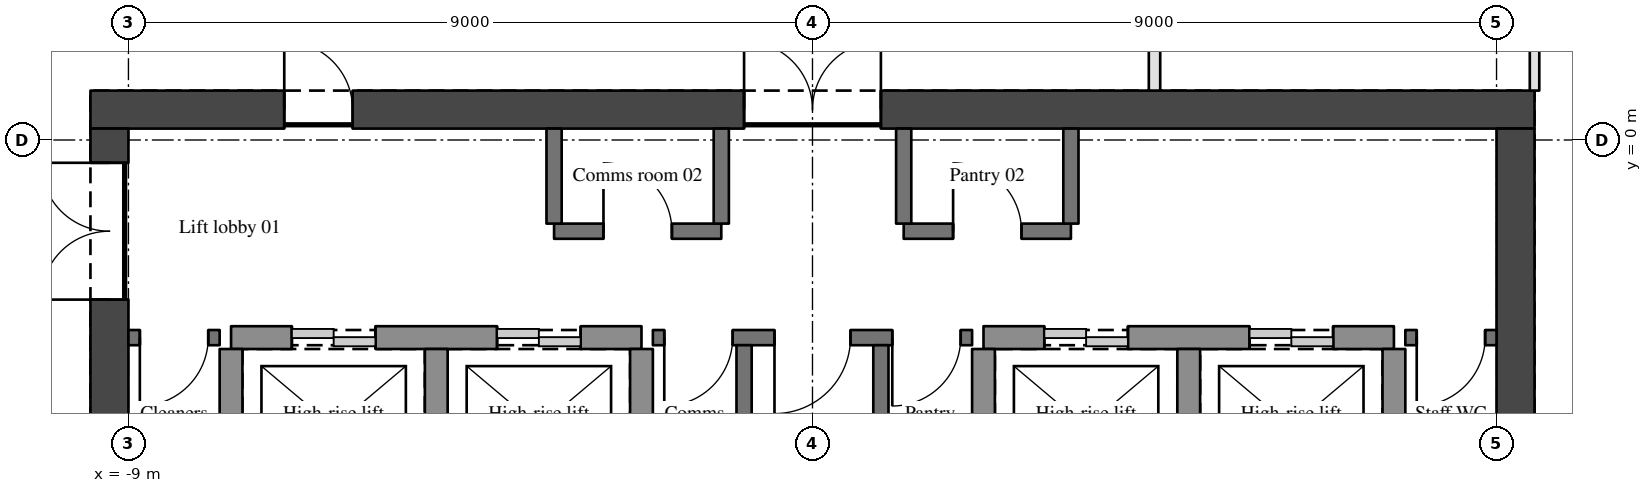
"""IFC4 building model, lengths in metres.
Left out: names, types, materials, properties, quantities, classifications, styles, units other than length and angle.
Written with IfcOpenShell. Run it as: python <this file> out.ifc"""

import sys

from ifc_helpers import new_model, si_unit, direction, frame, frame_2d, origin, place, context, subcontext, project, spatial, rectangle, extrude, element, fill, save


model = new_model("IFC4")
c1 = context("Model", 3, precision=1e-05, world=origin(), true_north=direction((0.0, 1.0)))
c2 = subcontext(c1, "Body", "Model", "MODEL_VIEW")
j1 = project(units=[si_unit("LENGTHUNIT", "METRE"), si_unit("PLANEANGLEUNIT", "RADIAN")], contexts=[c1])
p1 = place(None, origin())
s1 = spatial("IfcSite", under=j1, at=p1, CompositionType="ELEMENT")
p2 = place(p1, origin())
s2 = spatial("IfcBuilding", under=s1, at=p2, CompositionType="ELEMENT")
p3 = place(p2, frame((0.0, 0.0, 251.85)))
s3 = spatial("IfcBuildingStorey", under=s2, at=p3, CompositionType="ELEMENT", Elevation=251.85)
p4 = place(p3, frame((-9.5, 0.4, 0.0), z_axis=(0.0, 0.0, 1.0), x_axis=(1.0, 0.0, 0.0)))
e1 = element("IfcWall", 1, at=p4, inside=s3, PredefinedType="SHEAR", context=c2, shape_type="SweptSolid", body=[
    extrude(rectangle(XDim=19.0, YDim=0.5, at=frame_2d((9.5, 0.0))), origin(), (0.0, 0.0, 1.0), 3.15),
])
p5 = place(p4, frame((8.6, 0.0, 0.0)))
e2 = element("IfcOpeningElement", 2, at=p5, cuts=e1, PredefinedType="OPENING", context=c2, shape_type="SweptSolid", body=[
    extrude(rectangle(XDim=1.8, YDim=2.1, at=frame_2d((0.9, 1.05))), frame((0.0, 0.26, 0.0), z_axis=(0.0, -1.0, 0.0), x_axis=(1.0, 0.0, 0.0)), (0.0, 0.0, 1.0), 0.52),
])
p6 = place(p4, frame((2.55, 0.0, 0.0)))
e3 = element("IfcOpeningElement", 3, at=p6, cuts=e1, PredefinedType="OPENING", context=c2, shape_type="SweptSolid", body=[
    extrude(rectangle(XDim=0.9, YDim=2.1, at=frame_2d((0.45, 1.05))), frame((0.0, 0.26, 0.0), z_axis=(0.0, -1.0, 0.0), x_axis=(1.0, 0.0, 0.0)), (0.0, 0.0, 1.0), 0.52),
])
p7 = place(p3, frame((-9.25, -11.5, 0.0), z_axis=(0.0, 0.0, 1.0), x_axis=(0.0, 1.0, 0.0)))
e4 = element("IfcWall", 4, at=p7, inside=s3, PredefinedType="SHEAR", context=c2, shape_type="SweptSolid", body=[
    extrude(rectangle(XDim=11.65, YDim=0.5, at=frame_2d((5.825, 0.0))), origin(), (0.0, 0.0, 1.0), 3.15),
])
p8 = place(p7, frame((9.4, 0.0, 0.0)))
e5 = element("IfcOpeningElement", 5, at=p8, cuts=e4, PredefinedType="OPENING", context=c2, shape_type="SweptSolid", body=[
    extrude(rectangle(XDim=1.8, YDim=2.1, at=frame_2d((0.9, 1.05))), frame((0.0, 0.26, 0.0), z_axis=(0.0, -1.0, 0.0), x_axis=(1.0, 0.0, 0.0)), (0.0, 0.0, 1.0), 0.52),
])
p9 = place(p3, frame((9.25, -11.5, 0.0), z_axis=(0.0, 0.0, 1.0), x_axis=(0.0, 1.0, 0.0)))
e6 = element("IfcWall", 6, at=p9, inside=s3, PredefinedType="SHEAR", context=c2, shape_type="SweptSolid", body=[
    extrude(rectangle(XDim=11.65, YDim=0.5, at=frame_2d((5.825, 0.0))), origin(), (0.0, 0.0, 1.0), 3.15),
])
p10 = place(p3, frame((-7.8, -2.6, 0.0), z_axis=(0.0, 0.0, 1.0), x_axis=(-1.0, 0.0, 0.0)))
e7 = element("IfcWall", 7, at=p10, inside=s3, PredefinedType="SOLIDWALL", context=c2, shape_type="SweptSolid", body=[
    extrude(rectangle(XDim=1.2, YDim=0.2, at=frame_2d((0.6, 0.0))), origin(), (0.0, 0.0, 1.0), 2.85),
])
p11 = place(p10, frame((0.15, 0.0, 0.0)))
e8 = element("IfcOpeningElement", 8, at=p11, cuts=e7, PredefinedType="OPENING", context=c2, shape_type="SweptSolid", body=[
    extrude(rectangle(XDim=0.9, YDim=2.1, at=frame_2d((0.45, 1.05))), frame((0.0, 0.11, 0.0), z_axis=(0.0, -1.0, 0.0), x_axis=(1.0, 0.0, 0.0)), (0.0, 0.0, 1.0), 0.22),
])
p12 = place(p3, frame((-7.65, -2.6, 0.0), z_axis=(0.0, 0.0, 1.0), x_axis=(1.0, 0.0, 0.0)))
e9 = element("IfcWall", 9, at=p12, inside=s3, PredefinedType="SHEAR", context=c2, shape_type="SweptSolid", body=[
    extrude(rectangle(XDim=5.4, YDim=0.3, at=frame_2d((2.7, 0.0))), origin(), (0.0, 0.0, 1.0), 3.15),
])
p13 = place(p12, frame((0.8, 0.0, 0.0)))
e10 = element("IfcOpeningElement", 10, at=p13, cuts=e9, PredefinedType="OPENING", context=c2, shape_type="SweptSolid", body=[
    extrude(rectangle(XDim=1.1, YDim=2.1, at=frame_2d((0.55, 1.05))), frame((0.0, 0.16, 0.0), z_axis=(0.0, -1.0, 0.0), x_axis=(1.0, 0.0, 0.0)), (0.0, 0.0, 1.0), 0.32),
])
p14 = place(p12, frame((3.5, 0.0, 0.0)))
e11 = element("IfcOpeningElement", 11, at=p14, cuts=e9, PredefinedType="OPENING", context=c2, shape_type="SweptSolid", body=[
    extrude(rectangle(XDim=1.1, YDim=2.1, at=frame_2d((0.55, 1.05))), frame((0.0, 0.16, 0.0), z_axis=(0.0, -1.0, 0.0), x_axis=(1.0, 0.0, 0.0)), (0.0, 0.0, 1.0), 0.32),
])
p15 = place(p3, frame((2.1, -2.6, 0.0), z_axis=(0.0, 0.0, 1.0), x_axis=(-1.0, 0.0, 0.0)))
e12 = element("IfcWall", 12, at=p15, inside=s3, PredefinedType="SOLIDWALL", context=c2, shape_type="SweptSolid", body=[
    extrude(rectangle(XDim=4.2, YDim=0.2, at=frame_2d((2.1, 0.0))), origin(), (0.0, 0.0, 1.0), 2.85),
])
p16 = place(p15, frame((1.6, 0.0, 0.0)))
e13 = element("IfcOpeningElement", 13, at=p16, cuts=e12, PredefinedType="OPENING", context=c2, shape_type="SweptSolid", body=[
    extrude(rectangle(XDim=1.0, YDim=2.1, at=frame_2d((0.5, 1.05))), frame((0.0, 0.11, 0.0), z_axis=(0.0, -1.0, 0.0), x_axis=(1.0, 0.0, 0.0)), (0.0, 0.0, 1.0), 0.22),
])
p17 = place(p15, frame((3.15, 0.0, 0.0)))
e14 = element("IfcOpeningElement", 14, at=p17, cuts=e12, PredefinedType="OPENING", context=c2, shape_type="SweptSolid", body=[
    extrude(rectangle(XDim=0.9, YDim=2.1, at=frame_2d((0.45, 1.05))), frame((0.0, 0.11, 0.0), z_axis=(0.0, -1.0, 0.0), x_axis=(1.0, 0.0, 0.0)), (0.0, 0.0, 1.0), 0.22),
])
p18 = place(p15, frame((0.15, 0.0, 0.0)))
e15 = element("IfcOpeningElement", 15, at=p18, cuts=e12, PredefinedType="OPENING", context=c2, shape_type="SweptSolid", body=[
    extrude(rectangle(XDim=0.9, YDim=2.1, at=frame_2d((0.45, 1.05))), frame((0.0, 0.11, 0.0), z_axis=(0.0, -1.0, 0.0), x_axis=(1.0, 0.0, 0.0)), (0.0, 0.0, 1.0), 0.22),
])
p19 = place(p3, frame((2.25, -2.6, 0.0), z_axis=(0.0, 0.0, 1.0), x_axis=(1.0, 0.0, 0.0)))
e16 = element("IfcWall", 16, at=p19, inside=s3, PredefinedType="SHEAR", context=c2, shape_type="SweptSolid", body=[
    extrude(rectangle(XDim=5.4, YDim=0.3, at=frame_2d((2.7, 0.0))), origin(), (0.0, 0.0, 1.0), 3.15),
])
p20 = place(p19, frame((0.8, 0.0, 0.0)))
e17 = element("IfcOpeningElement", 17, at=p20, cuts=e16, PredefinedType="OPENING", context=c2, shape_type="SweptSolid", body=[
    extrude(rectangle(XDim=1.1, YDim=2.1, at=frame_2d((0.55, 1.05))), frame((0.0, 0.16, 0.0), z_axis=(0.0, -1.0, 0.0), x_axis=(1.0, 0.0, 0.0)), (0.0, 0.0, 1.0), 0.32),
])
p21 = place(p19, frame((3.5, 0.0, 0.0)))
e18 = element("IfcOpeningElement", 18, at=p21, cuts=e16, PredefinedType="OPENING", context=c2, shape_type="SweptSolid", body=[
    extrude(rectangle(XDim=1.1, YDim=2.1, at=frame_2d((0.55, 1.05))), frame((0.0, 0.16, 0.0), z_axis=(0.0, -1.0, 0.0), x_axis=(1.0, 0.0, 0.0)), (0.0, 0.0, 1.0), 0.32),
])
p22 = place(p3, frame((9.0, -2.6, 0.0), z_axis=(0.0, 0.0, 1.0), x_axis=(-1.0, 0.0, 0.0)))
e19 = element("IfcWall", 19, at=p22, inside=s3, PredefinedType="SOLIDWALL", context=c2, shape_type="SweptSolid", body=[
    extrude(rectangle(XDim=1.2, YDim=0.2, at=frame_2d((0.6, 0.0))), origin(), (0.0, 0.0, 1.0), 2.85),
])
p23 = place(p22, frame((0.15, 0.0, 0.0)))
e20 = element("IfcOpeningElement", 20, at=p23, cuts=e19, PredefinedType="OPENING", context=c2, shape_type="SweptSolid", body=[
    extrude(rectangle(XDim=0.9, YDim=2.1, at=frame_2d((0.45, 1.05))), frame((0.0, 0.11, 0.0), z_axis=(0.0, -1.0, 0.0), x_axis=(1.0, 0.0, 0.0)), (0.0, 0.0, 1.0), 0.22),
])
p24 = place(p3, frame((-3.4, -1.2, 0.0), z_axis=(0.0, 0.0, 1.0), x_axis=(1.0, 0.0, 0.0)))
e21 = element("IfcWall", 21, at=p24, inside=s3, PredefinedType="SOLIDWALL", context=c2, shape_type="SweptSolid", body=[
    extrude(rectangle(XDim=2.2, YDim=0.2, at=frame_2d((1.1, 0.0))), origin(), (0.0, 0.0, 1.0), 2.85),
])
p25 = place(p24, frame((0.65, 0.0, 0.0)))
e22 = element("IfcOpeningElement", 22, at=p25, cuts=e21, PredefinedType="OPENING", context=c2, shape_type="SweptSolid", body=[
    extrude(rectangle(XDim=0.9, YDim=2.1, at=frame_2d((0.45, 1.05))), frame((0.0, 0.11, 0.0), z_axis=(0.0, -1.0, 0.0), x_axis=(1.0, 0.0, 0.0)), (0.0, 0.0, 1.0), 0.22),
])
p26 = place(p3, frame((1.2, -1.2, 0.0), z_axis=(0.0, 0.0, 1.0), x_axis=(1.0, 0.0, 0.0)))
e23 = element("IfcWall", 23, at=p26, inside=s3, PredefinedType="SOLIDWALL", context=c2, shape_type="SweptSolid", body=[
    extrude(rectangle(XDim=2.2, YDim=0.2, at=frame_2d((1.1, 0.0))), origin(), (0.0, 0.0, 1.0), 2.85),
])
p27 = place(p26, frame((0.65, 0.0, 0.0)))
e24 = element("IfcOpeningElement", 24, at=p27, cuts=e23, PredefinedType="OPENING", context=c2, shape_type="SweptSolid", body=[
    extrude(rectangle(XDim=0.9, YDim=2.1, at=frame_2d((0.45, 1.05))), frame((0.0, 0.11, 0.0), z_axis=(0.0, -1.0, 0.0), x_axis=(1.0, 0.0, 0.0)), (0.0, 0.0, 1.0), 0.22),
])
for number, where, z_axis, x_axis in (
    (25, (-7.65, -4.8, 0.0), (0.0, 0.0, 1.0), (0.0, 1.0, 0.0)),
    (26, (-4.95, -4.8, 0.0), (0.0, 0.0, 1.0), (0.0, 1.0, 0.0)),
):
    element("IfcWall", number, at=place(p3, frame(where, z_axis=z_axis, x_axis=x_axis)), inside=s3, PredefinedType="SHEAR", context=c2, shape_type="SweptSolid", body=[
        extrude(rectangle(XDim=2.05, YDim=0.3, at=frame_2d((1.025, 0.0))), origin(), (0.0, 0.0, 1.0), 3.15),
    ])
p28 = place(p3, frame((-3.4, -1.1, 0.0), z_axis=(0.0, 0.0, 1.0), x_axis=(0.0, 1.0, 0.0)))
e27 = element("IfcWall", 27, at=p28, inside=s3, PredefinedType="SOLIDWALL", context=c2, shape_type="SweptSolid", body=[
    extrude(rectangle(XDim=1.25, YDim=0.2, at=frame_2d((0.625, 0.0))), origin(), (0.0, 0.0, 1.0), 2.85),
])
p29 = place(p3, frame((-2.25, -4.8, 0.0), z_axis=(0.0, 0.0, 1.0), x_axis=(0.0, 1.0, 0.0)))
e28 = element("IfcWall", 28, at=p29, inside=s3, PredefinedType="SHEAR", context=c2, shape_type="SweptSolid", body=[
    extrude(rectangle(XDim=2.05, YDim=0.3, at=frame_2d((1.025, 0.0))), origin(), (0.0, 0.0, 1.0), 3.15),
])
p30 = place(p3, frame((-1.2, -1.1, 0.0), z_axis=(0.0, 0.0, 1.0), x_axis=(0.0, 1.0, 0.0)))
e29 = element("IfcWall", 29, at=p30, inside=s3, PredefinedType="SOLIDWALL", context=c2, shape_type="SweptSolid", body=[
    extrude(rectangle(XDim=1.25, YDim=0.2, at=frame_2d((0.625, 0.0))), origin(), (0.0, 0.0, 1.0), 2.85),
])
for number, where, z_axis, x_axis in (
    (30, (-0.9, -4.85, 0.0), (0.0, 0.0, 1.0), (0.0, 1.0, 0.0)),
    (31, (0.9, -4.85, 0.0), (0.0, 0.0, 1.0), (0.0, 1.0, 0.0)),
):
    element("IfcWall", number, at=place(p3, frame(where, z_axis=z_axis, x_axis=x_axis)), inside=s3, PredefinedType="SOLIDWALL", context=c2, shape_type="SweptSolid", body=[
        extrude(rectangle(XDim=2.15, YDim=0.2, at=frame_2d((1.075, 0.0))), origin(), (0.0, 0.0, 1.0), 2.85),
    ])
p31 = place(p3, frame((1.2, -1.1, 0.0), z_axis=(0.0, 0.0, 1.0), x_axis=(0.0, 1.0, 0.0)))
e32 = element("IfcWall", 32, at=p31, inside=s3, PredefinedType="SOLIDWALL", context=c2, shape_type="SweptSolid", body=[
    extrude(rectangle(XDim=1.25, YDim=0.2, at=frame_2d((0.625, 0.0))), origin(), (0.0, 0.0, 1.0), 2.85),
])
p32 = place(p3, frame((2.25, -4.8, 0.0), z_axis=(0.0, 0.0, 1.0), x_axis=(0.0, 1.0, 0.0)))
e33 = element("IfcWall", 33, at=p32, inside=s3, PredefinedType="SHEAR", context=c2, shape_type="SweptSolid", body=[
    extrude(rectangle(XDim=2.05, YDim=0.3, at=frame_2d((1.025, 0.0))), origin(), (0.0, 0.0, 1.0), 3.15),
])
p33 = place(p3, frame((3.4, -1.1, 0.0), z_axis=(0.0, 0.0, 1.0), x_axis=(0.0, 1.0, 0.0)))
e34 = element("IfcWall", 34, at=p33, inside=s3, PredefinedType="SOLIDWALL", context=c2, shape_type="SweptSolid", body=[
    extrude(rectangle(XDim=1.25, YDim=0.2, at=frame_2d((0.625, 0.0))), origin(), (0.0, 0.0, 1.0), 2.85),
])
p34 = place(p3, frame((4.5, 5.325, 0.0), z_axis=(0.0, 0.0, 1.0), x_axis=(0.0, -1.0, 0.0)))
e35 = element("IfcWall", 35, at=p34, inside=s3, PredefinedType="PARTITIONING", context=c2, shape_type="SweptSolid", body=[
    extrude(rectangle(XDim=4.675, YDim=0.15, at=frame_2d((2.337, 0.0))), origin(), (0.0, 0.0, 1.0), 2.21),
])
p35 = place(p34, frame((1.85, 0.0, 0.0)))
e36 = element("IfcOpeningElement", 36, at=p35, cuts=e35, PredefinedType="OPENING", context=c2, shape_type="SweptSolid", body=[
    extrude(rectangle(XDim=0.9, YDim=2.1, at=frame_2d((0.45, 1.05))), frame((0.0, 0.085, 0.0), z_axis=(0.0, -1.0, 0.0), x_axis=(1.0, 0.0, 0.0)), (0.0, 0.0, 1.0), 0.17),
])
for number, where, z_axis, x_axis in (
    (37, (4.95, -4.8, 0.0), (0.0, 0.0, 1.0), (0.0, 1.0, 0.0)),
    (38, (7.65, -4.8, 0.0), (0.0, 0.0, 1.0), (0.0, 1.0, 0.0)),
):
    element("IfcWall", number, at=place(p3, frame(where, z_axis=z_axis, x_axis=x_axis)), inside=s3, PredefinedType="SHEAR", context=c2, shape_type="SweptSolid", body=[
        extrude(rectangle(XDim=2.05, YDim=0.3, at=frame_2d((1.025, 0.0))), origin(), (0.0, 0.0, 1.0), 3.15),
    ])
p36 = place(p3, frame((9.5, 0.65, 0.0), z_axis=(0.0, 0.0, 1.0), x_axis=(0.0, 1.0, 0.0)))
e39 = element("IfcWall", 39, at=p36, inside=s3, PredefinedType="PARTITIONING", context=c2, shape_type="SweptSolid", body=[
    extrude(rectangle(XDim=8.85, YDim=0.125, at=frame_2d((4.425, 0.0))), origin(), (0.0, 0.0, 1.0), 2.21),
])
p37 = place(p8, origin())
e40 = element("IfcDoor", 40, at=p37, inside=s3, OperationType="DOUBLE_DOOR_SINGLE_SWING", PredefinedType="DOOR", context=c2, shape_type="SweptSolid", body=[
    extrude(rectangle(XDim=1.8, YDim=2.1, at=frame_2d((0.9, 1.05))), frame((0.0, 0.025, 0.0), z_axis=(0.0, -1.0, 0.0), x_axis=(1.0, 0.0, 0.0)), (0.0, 0.0, 1.0), 0.05),
])
fill(e5, e40)
p38 = place(p5, origin())
e41 = element("IfcDoor", 41, at=p38, inside=s3, OperationType="DOUBLE_DOOR_SINGLE_SWING", PredefinedType="DOOR", context=c2, shape_type="SweptSolid", body=[
    extrude(rectangle(XDim=1.8, YDim=2.1, at=frame_2d((0.9, 1.05))), frame((0.0, 0.025, 0.0), z_axis=(0.0, -1.0, 0.0), x_axis=(1.0, 0.0, 0.0)), (0.0, 0.0, 1.0), 0.05),
])
fill(e2, e41)
p39 = place(p16, origin())
e42 = element("IfcDoor", 42, at=p39, inside=s3, OperationType="SINGLE_SWING_RIGHT", PredefinedType="DOOR", context=c2, shape_type="SweptSolid", body=[
    extrude(rectangle(XDim=1.0, YDim=2.1, at=frame_2d((0.5, 1.05))), frame((0.0, 0.025, 0.0), z_axis=(0.0, -1.0, 0.0), x_axis=(1.0, 0.0, 0.0)), (0.0, 0.0, 1.0), 0.05),
])
fill(e13, e42)
p40 = place(p17, origin())
e43 = element("IfcDoor", 43, at=p40, inside=s3, OperationType="SINGLE_SWING_RIGHT", PredefinedType="DOOR", context=c2, shape_type="SweptSolid", body=[
    extrude(rectangle(XDim=0.9, YDim=2.1, at=frame_2d((0.45, 1.05))), frame((0.0, 0.025, 0.0), z_axis=(0.0, -1.0, 0.0), x_axis=(1.0, 0.0, 0.0)), (0.0, 0.0, 1.0), 0.05),
])
fill(e14, e43)
p41 = place(p18, origin())
e44 = element("IfcDoor", 44, at=p41, inside=s3, OperationType="SINGLE_SWING_RIGHT", PredefinedType="DOOR", context=c2, shape_type="SweptSolid", body=[
    extrude(rectangle(XDim=0.9, YDim=2.1, at=frame_2d((0.45, 1.05))), frame((0.0, 0.025, 0.0), z_axis=(0.0, -1.0, 0.0), x_axis=(1.0, 0.0, 0.0)), (0.0, 0.0, 1.0), 0.05),
])
fill(e15, e44)
p42 = place(p23, origin())
e45 = element("IfcDoor", 45, at=p42, inside=s3, OperationType="SINGLE_SWING_RIGHT", PredefinedType="DOOR", context=c2, shape_type="SweptSolid", body=[
    extrude(rectangle(XDim=0.9, YDim=2.1, at=frame_2d((0.45, 1.05))), frame((0.0, 0.025, 0.0), z_axis=(0.0, -1.0, 0.0), x_axis=(1.0, 0.0, 0.0)), (0.0, 0.0, 1.0), 0.05),
])
fill(e20, e45)
p43 = place(p11, origin())
e46 = element("IfcDoor", 46, at=p43, inside=s3, OperationType="SINGLE_SWING_RIGHT", PredefinedType="DOOR", context=c2, shape_type="SweptSolid", body=[
    extrude(rectangle(XDim=0.9, YDim=2.1, at=frame_2d((0.45, 1.05))), frame((0.0, 0.025, 0.0), z_axis=(0.0, -1.0, 0.0), x_axis=(1.0, 0.0, 0.0)), (0.0, 0.0, 1.0), 0.05),
])
fill(e8, e46)
p44 = place(p6, origin())
e47 = element("IfcDoor", 47, at=p44, inside=s3, OperationType="SINGLE_SWING_LEFT", PredefinedType="DOOR", context=c2, shape_type="SweptSolid", body=[
    extrude(rectangle(XDim=0.9, YDim=2.1, at=frame_2d((0.45, 1.05))), frame((0.0, 0.025, 0.0), z_axis=(0.0, -1.0, 0.0), x_axis=(1.0, 0.0, 0.0)), (0.0, 0.0, 1.0), 0.05),
])
fill(e3, e47)
p45 = place(p25, origin())
e48 = element("IfcDoor", 48, at=p45, inside=s3, OperationType="SINGLE_SWING_LEFT", PredefinedType="DOOR", context=c2, shape_type="SweptSolid", body=[
    extrude(rectangle(XDim=0.9, YDim=2.1, at=frame_2d((0.45, 1.05))), frame((0.0, 0.025, 0.0), z_axis=(0.0, -1.0, 0.0), x_axis=(1.0, 0.0, 0.0)), (0.0, 0.0, 1.0), 0.05),
])
fill(e22, e48)
p46 = place(p27, origin())
e49 = element("IfcDoor", 49, at=p46, inside=s3, OperationType="SINGLE_SWING_LEFT", PredefinedType="DOOR", context=c2, shape_type="SweptSolid", body=[
    extrude(rectangle(XDim=0.9, YDim=2.1, at=frame_2d((0.45, 1.05))), frame((0.0, 0.025, 0.0), z_axis=(0.0, -1.0, 0.0), x_axis=(1.0, 0.0, 0.0)), (0.0, 0.0, 1.0), 0.05),
])
fill(e24, e49)
p47 = place(p13, origin())
e50 = element("IfcDoor", 50, at=p47, inside=s3, OperationType="DOUBLE_DOOR_SLIDING", PredefinedType="DOOR", context=c2, shape_type="SweptSolid", body=[
    extrude(rectangle(XDim=1.1, YDim=2.1, at=frame_2d((0.55, 1.05))), frame((0.0, 0.025, 0.0), z_axis=(0.0, -1.0, 0.0), x_axis=(1.0, 0.0, 0.0)), (0.0, 0.0, 1.0), 0.05),
])
fill(e10, e50)
p48 = place(p14, origin())
e51 = element("IfcDoor", 51, at=p48, inside=s3, OperationType="DOUBLE_DOOR_SLIDING", PredefinedType="DOOR", context=c2, shape_type="SweptSolid", body=[
    extrude(rectangle(XDim=1.1, YDim=2.1, at=frame_2d((0.55, 1.05))), frame((0.0, 0.025, 0.0), z_axis=(0.0, -1.0, 0.0), x_axis=(1.0, 0.0, 0.0)), (0.0, 0.0, 1.0), 0.05),
])
fill(e11, e51)
p49 = place(p20, origin())
e52 = element("IfcDoor", 52, at=p49, inside=s3, OperationType="DOUBLE_DOOR_SLIDING", PredefinedType="DOOR", context=c2, shape_type="SweptSolid", body=[
    extrude(rectangle(XDim=1.1, YDim=2.1, at=frame_2d((0.55, 1.05))), frame((0.0, 0.025, 0.0), z_axis=(0.0, -1.0, 0.0), x_axis=(1.0, 0.0, 0.0)), (0.0, 0.0, 1.0), 0.05),
])
fill(e17, e52)
p50 = place(p21, origin())
e53 = element("IfcDoor", 53, at=p50, inside=s3, OperationType="DOUBLE_DOOR_SLIDING", PredefinedType="DOOR", context=c2, shape_type="SweptSolid", body=[
    extrude(rectangle(XDim=1.1, YDim=2.1, at=frame_2d((0.55, 1.05))), frame((0.0, 0.025, 0.0), z_axis=(0.0, -1.0, 0.0), x_axis=(1.0, 0.0, 0.0)), (0.0, 0.0, 1.0), 0.05),
])
fill(e18, e53)
save(model, sys.argv[1])
